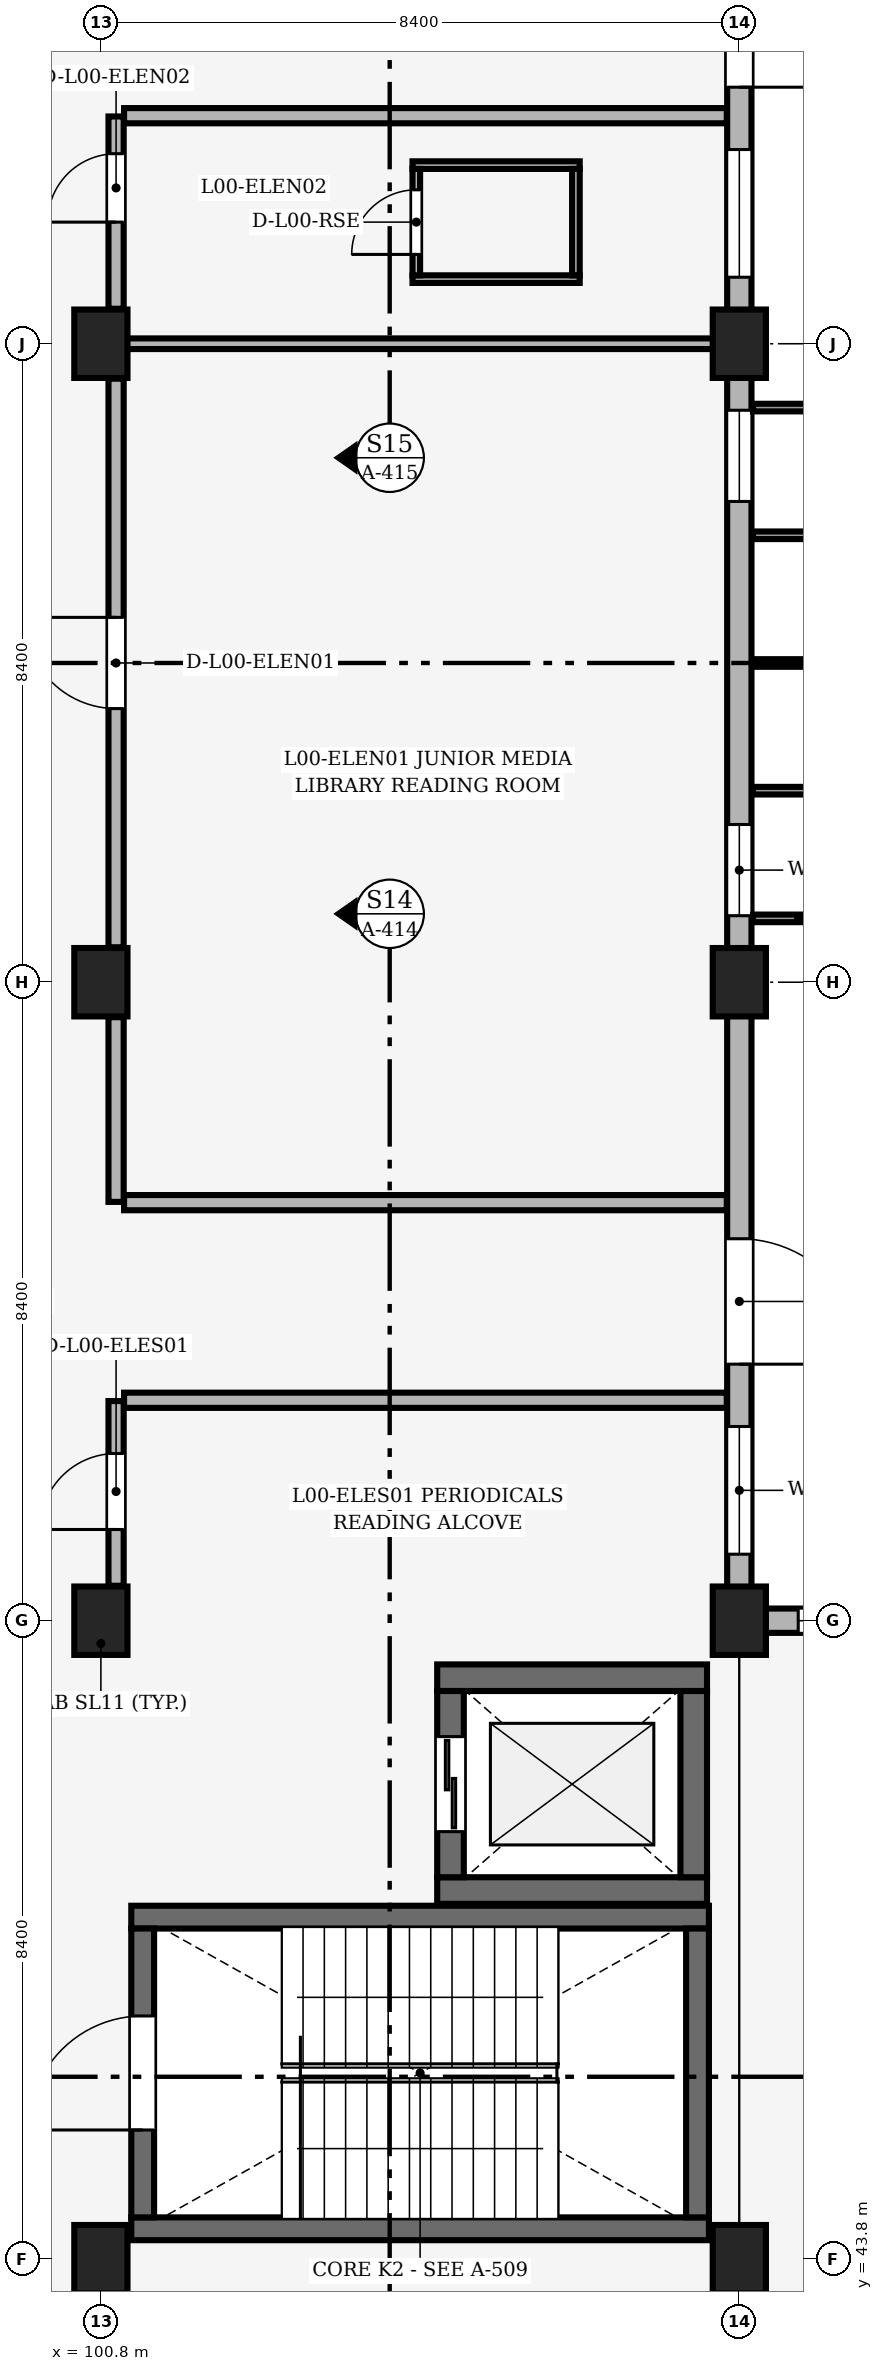
"""IFC4 building model, lengths in metres.
Left out: names, types, materials, properties, quantities, classifications, styles, units other than length and angle.
Written with IfcOpenShell. Run it as: python <this file> out.ifc"""

import sys

from ifc_helpers import new_model, si_unit, direction, frame, frame_2d, origin, origin_2d, place, context, subcontext, project, spatial, rectangle, extrude, element, fill, save


model = new_model("IFC4")
c1 = context("Model", 3, precision=1e-05, world=origin(), true_north=direction((0.0, 1.0)))
c2 = subcontext(c1, "Body", "Model", "MODEL_VIEW")
j1 = project(units=[si_unit("LENGTHUNIT", "METRE"), si_unit("PLANEANGLEUNIT", "RADIAN")], contexts=[c1])
p1 = place(None, origin())
s1 = spatial("IfcSite", under=j1, at=p1, CompositionType="ELEMENT")
p2 = place(p1, origin())
s2 = spatial("IfcBuilding", under=s1, at=p2, CompositionType="ELEMENT")
p3 = place(p2, origin())
s3 = spatial("IfcBuildingStorey", under=s2, at=p3, CompositionType="ELEMENT", Elevation=0.0)
for number, where, z_axis, x_axis in (
    (1, (100.8, 43.8, 0.0), (0.0, 0.0, 1.0), (1.0, 0.0, 0.0)),
    (2, (100.8, 52.2, 0.0), (0.0, 0.0, 1.0), (1.0, 0.0, 0.0)),
    (3, (100.8, 60.6, 0.0), (0.0, 0.0, 1.0), (1.0, 0.0, 0.0)),
    (4, (100.8, 69.0, 0.0), (0.0, 0.0, 1.0), (1.0, 0.0, 0.0)),
    (5, (109.2, 43.8, 0.0), (0.0, 0.0, 1.0), (1.0, 0.0, 0.0)),
    (6, (109.2, 52.2, 0.0), (0.0, 0.0, 1.0), (1.0, 0.0, 0.0)),
    (7, (109.2, 60.6, 0.0), (0.0, 0.0, 1.0), (1.0, 0.0, 0.0)),
    (8, (109.2, 69.0, 0.0), (0.0, 0.0, 1.0), (1.0, 0.0, 0.0)),
):
    element("IfcColumn", number, at=place(p3, frame(where, z_axis=z_axis, x_axis=x_axis)), inside=s3, PredefinedType="COLUMN", context=c2, shape_type="SweptSolid", body=[
        extrude(rectangle(XDim=0.7, YDim=0.9, at=origin_2d()), origin(), (0.0, 0.0, 1.0), 4.8),
    ])
p4 = place(p3, frame((109.525, 52.2, 0.0), z_axis=(0.0, 0.0, 1.0), x_axis=(1.0, 0.0, 0.0)))
e9 = element("IfcWall", 9, at=p4, inside=s3, PredefinedType="SOLIDWALL", context=c2, shape_type="SweptSolid", body=[
    extrude(rectangle(XDim=7.85, YDim=0.32, at=frame_2d((3.925, 0.0))), origin(), (0.0, 0.0, 1.0), 4.03),
])
p5 = place(p4, frame((0.45, 0.0, 0.9)))
e10 = element("IfcOpeningElement", 10, at=p5, cuts=e9, PredefinedType="OPENING", context=c2, shape_type="SweptSolid", body=[
    extrude(rectangle(XDim=1.2, YDim=1.5, at=frame_2d((0.6, 0.75))), frame((0.0, 0.17, 0.0), z_axis=(0.0, -1.0, 0.0), x_axis=(1.0, 0.0, 0.0)), (0.0, 0.0, 1.0), 0.34),
])
p6 = place(p4, frame((6.2, 0.0, 0.9)))
e11 = element("IfcOpeningElement", 11, at=p6, cuts=e9, PredefinedType="OPENING", context=c2, shape_type="SweptSolid", body=[
    extrude(rectangle(XDim=1.2, YDim=1.8, at=frame_2d((0.6, 0.9))), frame((0.0, 0.17, 0.0), z_axis=(0.0, -1.0, 0.0), x_axis=(1.0, 0.0, 0.0)), (0.0, 0.0, 1.0), 0.34),
])
p7 = place(p3, frame((109.2, 52.625, 0.0), z_axis=(0.0, 0.0, 1.0), x_axis=(0.0, 1.0, 0.0)))
e12 = element("IfcWall", 12, at=p7, inside=s3, PredefinedType="SOLIDWALL", context=c2, shape_type="SweptSolid", body=[
    extrude(rectangle(XDim=7.55, YDim=0.32, at=frame_2d((3.775, 0.0))), origin(), (0.0, 0.0, 1.0), 3.89),
])
p8 = place(p7, frame((4.6, 0.0, 0.0), z_axis=(0.0, 0.0, 1.0), x_axis=(-1.0, 0.0, 0.0)))
e13 = element("IfcOpeningElement", 13, at=p8, cuts=e12, PredefinedType="OPENING", context=c2, shape_type="SweptSolid", body=[
    extrude(rectangle(XDim=1.65, YDim=2.25, at=frame_2d((0.825, 1.125))), frame((0.0, 0.17, 0.0), z_axis=(0.0, -1.0, 0.0), x_axis=(1.0, 0.0, 0.0)), (0.0, 0.0, 1.0), 0.34),
])
p9 = place(p7, frame((0.45, 0.0, 0.95)))
e14 = element("IfcOpeningElement", 14, at=p9, cuts=e12, PredefinedType="OPENING", context=c2, shape_type="SweptSolid", body=[
    extrude(rectangle(XDim=1.68, YDim=2.1, at=frame_2d((0.84, 1.05))), frame((0.0, 0.17, 0.0), z_axis=(0.0, -1.0, 0.0), x_axis=(1.0, 0.0, 0.0)), (0.0, 0.0, 1.0), 0.34),
])
p10 = place(p3, frame((109.2, 61.025, 0.0), z_axis=(0.0, 0.0, 1.0), x_axis=(0.0, 1.0, 0.0)))
e15 = element("IfcWall", 15, at=p10, inside=s3, PredefinedType="SOLIDWALL", context=c2, shape_type="SweptSolid", body=[
    extrude(rectangle(XDim=7.55, YDim=0.32, at=frame_2d((3.775, 0.0))), origin(), (0.0, 0.0, 1.0), 3.84),
])
p11 = place(p10, frame((0.45, 0.0, 0.85)))
e16 = element("IfcOpeningElement", 16, at=p11, cuts=e15, PredefinedType="OPENING", context=c2, shape_type="SweptSolid", body=[
    extrude(rectangle(XDim=1.2, YDim=1.8, at=frame_2d((0.6, 0.9))), frame((0.0, 0.17, 0.0), z_axis=(0.0, -1.0, 0.0), x_axis=(1.0, 0.0, 0.0)), (0.0, 0.0, 1.0), 0.34),
])
p12 = place(p10, frame((5.9, 0.0, 0.85)))
e17 = element("IfcOpeningElement", 17, at=p12, cuts=e15, PredefinedType="OPENING", context=c2, shape_type="SweptSolid", body=[
    extrude(rectangle(XDim=1.2, YDim=1.8, at=frame_2d((0.6, 0.9))), frame((0.0, 0.17, 0.0), z_axis=(0.0, -1.0, 0.0), x_axis=(1.0, 0.0, 0.0)), (0.0, 0.0, 1.0), 0.34),
])
p13 = place(p3, frame((109.2, 69.425, 0.0), z_axis=(0.0, 0.0, 1.0), x_axis=(0.0, 1.0, 0.0)))
e18 = element("IfcWall", 18, at=p13, inside=s3, PredefinedType="SOLIDWALL", context=c2, shape_type="SweptSolid", body=[
    extrude(rectangle(XDim=7.55, YDim=0.32, at=frame_2d((3.775, 0.0))), origin(), (0.0, 0.0, 1.0), 3.89),
])
p14 = place(p13, frame((4.6, 0.0, 0.0), z_axis=(0.0, 0.0, 1.0), x_axis=(-1.0, 0.0, 0.0)))
e19 = element("IfcOpeningElement", 19, at=p14, cuts=e18, PredefinedType="OPENING", context=c2, shape_type="SweptSolid", body=[
    extrude(rectangle(XDim=1.65, YDim=2.25, at=frame_2d((0.825, 1.125))), frame((0.0, 0.17, 0.0), z_axis=(0.0, -1.0, 0.0), x_axis=(1.0, 0.0, 0.0)), (0.0, 0.0, 1.0), 0.34),
])
p15 = place(p13, frame((0.45, 0.0, 0.95)))
e20 = element("IfcOpeningElement", 20, at=p15, cuts=e18, PredefinedType="OPENING", context=c2, shape_type="SweptSolid", body=[
    extrude(rectangle(XDim=1.68, YDim=2.1, at=frame_2d((0.84, 1.05))), frame((0.0, 0.17, 0.0), z_axis=(0.0, -1.0, 0.0), x_axis=(1.0, 0.0, 0.0)), (0.0, 0.0, 1.0), 0.34),
])
for number, where, z_axis, x_axis in (
    (21, (101.2, 44.2, 0.0), (0.0, 0.0, 1.0), (1.0, 0.0, 0.0)),
    (22, (101.2, 48.3, 0.0), (0.0, 0.0, 1.0), (1.0, 0.0, 0.0)),
):
    element("IfcWall", number, at=place(p3, frame(where, z_axis=z_axis, x_axis=x_axis)), inside=s3, PredefinedType="SHEAR", context=c2, shape_type="SweptSolid", body=[
        extrude(rectangle(XDim=7.6, YDim=0.3, at=frame_2d((3.8, 0.0))), origin(), (0.0, 0.0, 1.0), 4.625),
    ])
p16 = place(p3, frame((101.35, 44.35, 0.0), z_axis=(0.0, 0.0, 1.0), x_axis=(0.0, 1.0, 0.0)))
e23 = element("IfcWall", 23, at=p16, inside=s3, PredefinedType="SHEAR", context=c2, shape_type="SweptSolid", body=[
    extrude(rectangle(XDim=3.8, YDim=0.3, at=frame_2d((1.9, 0.0))), origin(), (0.0, 0.0, 1.0), 4.625),
])
p17 = place(p16, frame((1.15, 0.0, 0.0)))
e24 = element("IfcOpeningElement", 24, at=p17, cuts=e23, PredefinedType="OPENING", context=c2, shape_type="SweptSolid", body=[
    extrude(rectangle(XDim=1.5, YDim=2.2, at=frame_2d((0.75, 1.1))), frame((0.0, 0.16, 0.0), z_axis=(0.0, -1.0, 0.0), x_axis=(1.0, 0.0, 0.0)), (0.0, 0.0, 1.0), 0.32),
])
p18 = place(p3, frame((108.65, 44.35, 0.0), z_axis=(0.0, 0.0, 1.0), x_axis=(0.0, 1.0, 0.0)))
e25 = element("IfcWall", 25, at=p18, inside=s3, PredefinedType="SHEAR", context=c2, shape_type="SweptSolid", body=[
    extrude(rectangle(XDim=3.8, YDim=0.3, at=frame_2d((1.9, 0.0))), origin(), (0.0, 0.0, 1.0), 4.625),
])
for number, where, z_axis, x_axis in (
    (26, (105.225, 48.65, 0.0), (0.0, 0.0, 1.0), (1.0, 0.0, 0.0)),
    (27, (105.225, 51.45, 0.0), (0.0, 0.0, 1.0), (1.0, 0.0, 0.0)),
):
    element("IfcWall", number, at=place(p3, frame(where, z_axis=z_axis, x_axis=x_axis)), inside=s3, PredefinedType="SHEAR", context=c2, shape_type="SweptSolid", body=[
        extrude(rectangle(XDim=3.55, YDim=0.35, at=frame_2d((1.775, 0.0))), origin(), (0.0, 0.0, 1.0), 4.52),
    ])
p19 = place(p3, frame((105.4, 48.825, 0.0), z_axis=(0.0, 0.0, 1.0), x_axis=(0.0, 1.0, 0.0)))
e28 = element("IfcWall", 28, at=p19, inside=s3, PredefinedType="SHEAR", context=c2, shape_type="SweptSolid", body=[
    extrude(rectangle(XDim=2.45, YDim=0.35, at=frame_2d((1.225, 0.0))), origin(), (0.0, 0.0, 1.0), 4.52),
])
p20 = place(p19, frame((0.6, 0.0, 0.0)))
e29 = element("IfcOpeningElement", 29, at=p20, cuts=e28, PredefinedType="OPENING", context=c2, shape_type="SweptSolid", body=[
    extrude(rectangle(XDim=1.25, YDim=2.25, at=frame_2d((0.625, 1.125))), frame((0.0, 0.185, 0.0), z_axis=(0.0, -1.0, 0.0), x_axis=(1.0, 0.0, 0.0)), (0.0, 0.0, 1.0), 0.37),
])
p21 = place(p3, frame((108.6, 48.825, 0.0), z_axis=(0.0, 0.0, 1.0), x_axis=(0.0, 1.0, 0.0)))
e30 = element("IfcWall", 30, at=p21, inside=s3, PredefinedType="SHEAR", context=c2, shape_type="SweptSolid", body=[
    extrude(rectangle(XDim=2.45, YDim=0.35, at=frame_2d((1.225, 0.0))), origin(), (0.0, 0.0, 1.0), 4.52),
])
for number, where, z_axis, x_axis in (
    (31, (104.9, 69.85, 0.0), (0.0, 0.0, 1.0), (1.0, 0.0, 0.0)),
    (32, (104.9, 71.35, 0.0), (0.0, 0.0, 1.0), (1.0, 0.0, 0.0)),
):
    element("IfcWall", number, at=place(p3, frame(where, z_axis=z_axis, x_axis=x_axis)), inside=s3, PredefinedType="PARTITIONING", context=c2, shape_type="SweptSolid", body=[
        extrude(rectangle(XDim=2.2, YDim=0.1, at=frame_2d((1.1, 0.0))), origin(), (0.0, 0.0, 1.0), 4.5),
    ])
p22 = place(p3, frame((104.95, 69.9, 0.0), z_axis=(0.0, 0.0, 1.0), x_axis=(0.0, 1.0, 0.0)))
e33 = element("IfcWall", 33, at=p22, inside=s3, PredefinedType="PARTITIONING", context=c2, shape_type="SweptSolid", body=[
    extrude(rectangle(XDim=1.4, YDim=0.1, at=frame_2d((0.7, 0.0))), origin(), (0.0, 0.0, 1.0), 4.5),
])
p23 = place(p22, frame((0.275, 0.0, 0.0)))
e34 = element("IfcOpeningElement", 34, at=p23, cuts=e33, PredefinedType="OPENING", context=c2, shape_type="SweptSolid", body=[
    extrude(rectangle(XDim=0.85, YDim=2.05, at=frame_2d((0.425, 1.025))), frame((0.0, 0.06, 0.0), z_axis=(0.0, -1.0, 0.0), x_axis=(1.0, 0.0, 0.0)), (0.0, 0.0, 1.0), 0.12),
])
p24 = place(p3, frame((107.05, 69.9, 0.0), z_axis=(0.0, 0.0, 1.0), x_axis=(0.0, 1.0, 0.0)))
e35 = element("IfcWall", 35, at=p24, inside=s3, PredefinedType="PARTITIONING", context=c2, shape_type="SweptSolid", body=[
    extrude(rectangle(XDim=1.4, YDim=0.1, at=frame_2d((0.7, 0.0))), origin(), (0.0, 0.0, 1.0), 4.5),
])
p25 = place(p3, frame((101.0, 52.66, 0.0), z_axis=(0.0, 0.0, 1.0), x_axis=(0.0, 1.0, 0.0)))
e36 = element("IfcWall", 36, at=p25, inside=s3, PredefinedType="PARTITIONING", context=c2, shape_type="SweptSolid", body=[
    extrude(rectangle(XDim=2.43, YDim=0.2, at=frame_2d((1.215, 0.0))), origin(), (0.0, 0.0, 1.0), 3.74),
])
p26 = place(p25, frame((0.74, 0.0, 0.0)))
e37 = element("IfcOpeningElement", 37, at=p26, cuts=e36, PredefinedType="OPENING", context=c2, shape_type="SweptSolid", body=[
    extrude(rectangle(XDim=1.0, YDim=2.25, at=frame_2d((0.5, 1.125))), frame((0.0, 0.11, 0.0), z_axis=(0.0, -1.0, 0.0), x_axis=(1.0, 0.0, 0.0)), (0.0, 0.0, 1.0), 0.22),
])
for number, where, z_axis, x_axis in (
    (38, (101.105, 55.1, 0.0), (0.0, 0.0, 1.0), (1.0, 0.0, 0.0)),
    (39, (101.105, 57.7, 0.0), (0.0, 0.0, 1.0), (1.0, 0.0, 0.0)),
):
    element("IfcWall", number, at=place(p3, frame(where, z_axis=z_axis, x_axis=x_axis)), inside=s3, PredefinedType="PARTITIONING", context=c2, shape_type="SweptSolid", body=[
        extrude(rectangle(XDim=7.93, YDim=0.2, at=frame_2d((3.965, 0.0))), origin(), (0.0, 0.0, 1.0), 4.06),
    ])
p27 = place(p3, frame((101.105, 69.0, 0.0), z_axis=(0.0, 0.0, 1.0), x_axis=(1.0, 0.0, 0.0)))
e40 = element("IfcWall", 40, at=p27, inside=s3, PredefinedType="PARTITIONING", context=c2, shape_type="SweptSolid", body=[
    extrude(rectangle(XDim=7.93, YDim=0.14, at=frame_2d((3.965, 0.0))), origin(), (0.0, 0.0, 1.0), 3.89),
])
p28 = place(p3, frame((101.0, 57.71, 0.0), z_axis=(0.0, 0.0, 1.0), x_axis=(0.0, 1.0, 0.0)))
e41 = element("IfcWall", 41, at=p28, inside=s3, PredefinedType="PARTITIONING", context=c2, shape_type="SweptSolid", body=[
    extrude(rectangle(XDim=2.43, YDim=0.2, at=frame_2d((1.215, 0.0))), origin(), (0.0, 0.0, 1.0), 3.74),
])
p29 = place(p3, frame((101.0, 61.06, 0.0), z_axis=(0.0, 0.0, 1.0), x_axis=(0.0, 1.0, 0.0)))
e42 = element("IfcWall", 42, at=p29, inside=s3, PredefinedType="PARTITIONING", context=c2, shape_type="SweptSolid", body=[
    extrude(rectangle(XDim=7.48, YDim=0.2, at=frame_2d((3.74, 0.0))), origin(), (0.0, 0.0, 1.0), 3.79),
])
p30 = place(p29, frame((3.14, 0.0, 0.0)))
e43 = element("IfcOpeningElement", 43, at=p30, cuts=e42, PredefinedType="OPENING", context=c2, shape_type="SweptSolid", body=[
    extrude(rectangle(XDim=1.2, YDim=2.2, at=frame_2d((0.6, 1.1))), frame((0.0, 0.11, 0.0), z_axis=(0.0, -1.0, 0.0), x_axis=(1.0, 0.0, 0.0)), (0.0, 0.0, 1.0), 0.22),
])
p31 = place(p3, frame((101.0, 69.46, 0.0), z_axis=(0.0, 0.0, 1.0), x_axis=(0.0, 1.0, 0.0)))
e44 = element("IfcWall", 44, at=p31, inside=s3, PredefinedType="PARTITIONING", context=c2, shape_type="SweptSolid", body=[
    extrude(rectangle(XDim=2.53, YDim=0.2, at=frame_2d((1.265, 0.0))), origin(), (0.0, 0.0, 1.0), 3.74),
])
p32 = place(p31, frame((1.14, 0.0, 0.0)))
e45 = element("IfcOpeningElement", 45, at=p32, cuts=e44, PredefinedType="OPENING", context=c2, shape_type="SweptSolid", body=[
    extrude(rectangle(XDim=0.9, YDim=2.1, at=frame_2d((0.45, 1.05))), frame((0.0, 0.11, 0.0), z_axis=(0.0, -1.0, 0.0), x_axis=(1.0, 0.0, 0.0)), (0.0, 0.0, 1.0), 0.22),
])
p33 = place(p3, frame((101.105, 72.0, 0.0), z_axis=(0.0, 0.0, 1.0), x_axis=(1.0, 0.0, 0.0)))
e46 = element("IfcWall", 46, at=p33, inside=s3, PredefinedType="PARTITIONING", context=c2, shape_type="SweptSolid", body=[
    extrude(rectangle(XDim=7.93, YDim=0.2, at=frame_2d((3.965, 0.0))), origin(), (0.0, 0.0, 1.0), 4.06),
])
p34 = place(p5, origin())
e47 = element("IfcWindow", 47, at=p34, inside=s3, PartitioningType="SINGLE_PANEL", PredefinedType="WINDOW", context=c2, shape_type="SweptSolid", body=[
    extrude(rectangle(XDim=1.2, YDim=1.5, at=frame_2d((0.6, 0.75))), frame((0.0, 0.03, 0.0), z_axis=(0.0, -1.0, 0.0), x_axis=(1.0, 0.0, 0.0)), (0.0, 0.0, 1.0), 0.06),
])
fill(e10, e47)
p35 = place(p8, origin())
e48 = element("IfcDoor", 48, at=p35, inside=s3, OperationType="DOUBLE_DOOR_SINGLE_SWING", PredefinedType="DOOR", context=c2, shape_type="SweptSolid", body=[
    extrude(rectangle(XDim=1.65, YDim=2.25, at=frame_2d((0.825, 1.125))), frame((0.0, 0.025, 0.0), z_axis=(0.0, -1.0, 0.0), x_axis=(1.0, 0.0, 0.0)), (0.0, 0.0, 1.0), 0.05),
])
fill(e13, e48)
p36 = place(p9, origin())
e49 = element("IfcWindow", 49, at=p36, inside=s3, PartitioningType="SINGLE_PANEL", PredefinedType="WINDOW", context=c2, shape_type="SweptSolid", body=[
    extrude(rectangle(XDim=1.68, YDim=2.1, at=frame_2d((0.84, 1.05))), frame((0.0, 0.03, 0.0), z_axis=(0.0, -1.0, 0.0), x_axis=(1.0, 0.0, 0.0)), (0.0, 0.0, 1.0), 0.06),
])
fill(e14, e49)
p37 = place(p11, origin())
e50 = element("IfcWindow", 50, at=p37, inside=s3, PartitioningType="SINGLE_PANEL", PredefinedType="WINDOW", context=c2, shape_type="SweptSolid", body=[
    extrude(rectangle(XDim=1.2, YDim=1.8, at=frame_2d((0.6, 0.9))), frame((0.0, 0.03, 0.0), z_axis=(0.0, -1.0, 0.0), x_axis=(1.0, 0.0, 0.0)), (0.0, 0.0, 1.0), 0.06),
])
fill(e16, e50)
p38 = place(p12, origin())
e51 = element("IfcWindow", 51, at=p38, inside=s3, PartitioningType="SINGLE_PANEL", PredefinedType="WINDOW", context=c2, shape_type="SweptSolid", body=[
    extrude(rectangle(XDim=1.2, YDim=1.8, at=frame_2d((0.6, 0.9))), frame((0.0, 0.03, 0.0), z_axis=(0.0, -1.0, 0.0), x_axis=(1.0, 0.0, 0.0)), (0.0, 0.0, 1.0), 0.06),
])
fill(e17, e51)
p39 = place(p14, origin())
e52 = element("IfcDoor", 52, at=p39, inside=s3, OperationType="DOUBLE_DOOR_SINGLE_SWING", PredefinedType="DOOR", context=c2, shape_type="SweptSolid", body=[
    extrude(rectangle(XDim=1.65, YDim=2.25, at=frame_2d((0.825, 1.125))), frame((0.0, 0.025, 0.0), z_axis=(0.0, -1.0, 0.0), x_axis=(1.0, 0.0, 0.0)), (0.0, 0.0, 1.0), 0.05),
])
fill(e19, e52)
p40 = place(p15, origin())
e53 = element("IfcWindow", 53, at=p40, inside=s3, PartitioningType="SINGLE_PANEL", PredefinedType="WINDOW", context=c2, shape_type="SweptSolid", body=[
    extrude(rectangle(XDim=1.68, YDim=2.1, at=frame_2d((0.84, 1.05))), frame((0.0, 0.03, 0.0), z_axis=(0.0, -1.0, 0.0), x_axis=(1.0, 0.0, 0.0)), (0.0, 0.0, 1.0), 0.06),
])
fill(e20, e53)
p41 = place(p17, origin())
e54 = element("IfcDoor", 54, at=p41, inside=s3, OperationType="DOUBLE_DOOR_SINGLE_SWING", PredefinedType="DOOR", context=c2, shape_type="SweptSolid", body=[
    extrude(rectangle(XDim=1.5, YDim=2.2, at=frame_2d((0.75, 1.1))), frame((0.0, 0.025, 0.0), z_axis=(0.0, -1.0, 0.0), x_axis=(1.0, 0.0, 0.0)), (0.0, 0.0, 1.0), 0.05),
])
fill(e24, e54)
p42 = place(p20, origin())
e55 = element("IfcDoor", 55, at=p42, inside=s3, OperationType="DOUBLE_DOOR_SLIDING", PredefinedType="DOOR", context=c2, shape_type="SweptSolid", body=[
    extrude(rectangle(XDim=1.25, YDim=2.25, at=frame_2d((0.625, 1.125))), frame((0.0, 0.025, 0.0), z_axis=(0.0, -1.0, 0.0), x_axis=(1.0, 0.0, 0.0)), (0.0, 0.0, 1.0), 0.05),
])
fill(e29, e55)
p43 = place(p23, origin())
e56 = element("IfcDoor", 56, at=p43, inside=s3, OperationType="SINGLE_SWING_LEFT", PredefinedType="DOOR", context=c2, shape_type="SweptSolid", body=[
    extrude(rectangle(XDim=0.85, YDim=2.05, at=frame_2d((0.425, 1.025))), frame((0.0, 0.025, 0.0), z_axis=(0.0, -1.0, 0.0), x_axis=(1.0, 0.0, 0.0)), (0.0, 0.0, 1.0), 0.05),
])
fill(e34, e56)
p44 = place(p26, origin())
e57 = element("IfcDoor", 57, at=p44, inside=s3, OperationType="SINGLE_SWING_LEFT", PredefinedType="DOOR", context=c2, shape_type="SweptSolid", body=[
    extrude(rectangle(XDim=1.0, YDim=2.25, at=frame_2d((0.5, 1.125))), frame((0.0, 0.025, 0.0), z_axis=(0.0, -1.0, 0.0), x_axis=(1.0, 0.0, 0.0)), (0.0, 0.0, 1.0), 0.05),
])
fill(e37, e57)
p45 = place(p30, origin())
e58 = element("IfcDoor", 58, at=p45, inside=s3, OperationType="SINGLE_SWING_RIGHT", PredefinedType="DOOR", context=c2, shape_type="SweptSolid", body=[
    extrude(rectangle(XDim=1.2, YDim=2.2, at=frame_2d((0.6, 1.1))), frame((0.0, 0.025, 0.0), z_axis=(0.0, -1.0, 0.0), x_axis=(1.0, 0.0, 0.0)), (0.0, 0.0, 1.0), 0.05),
])
fill(e43, e58)
p46 = place(p32, origin())
e59 = element("IfcDoor", 59, at=p46, inside=s3, OperationType="SINGLE_SWING_LEFT", PredefinedType="DOOR", context=c2, shape_type="SweptSolid", body=[
    extrude(rectangle(XDim=0.9, YDim=2.1, at=frame_2d((0.45, 1.05))), frame((0.0, 0.025, 0.0), z_axis=(0.0, -1.0, 0.0), x_axis=(1.0, 0.0, 0.0)), (0.0, 0.0, 1.0), 0.05),
])
fill(e45, e59)
save(model, sys.argv[1])
